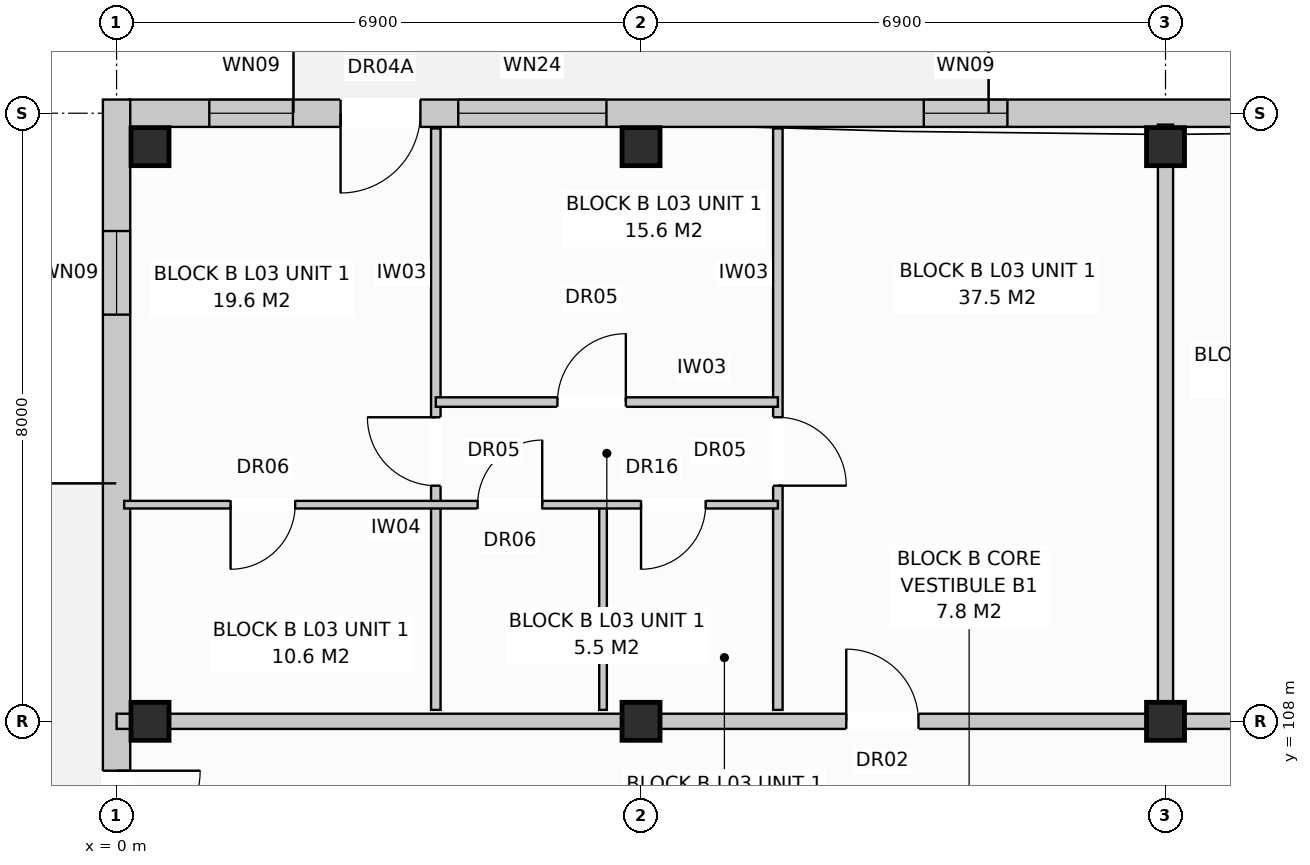
"""IFC4 building model, lengths in metres.
Left out: names, types, materials, properties, quantities, classifications, styles, units other than length and angle.
Written with IfcOpenShell. Run it as: python <this file> out.ifc"""

import sys

from ifc_helpers import new_model, si_unit, direction, frame, frame_2d, origin, origin_with_axes, origin_2d, place, context, subcontext, project, spatial, rectangle, extrude, element, fill, save


model = new_model("IFC4")
c1 = context("Model", 3, precision=1e-05, world=origin(), true_north=direction((0.0, 1.0)))
c2 = subcontext(c1, "Body", "Model", "MODEL_VIEW")
j1 = project(units=[si_unit("LENGTHUNIT", "METRE"), si_unit("PLANEANGLEUNIT", "RADIAN")], contexts=[c1])
p1 = place(None, origin())
s1 = spatial("IfcSite", under=j1, at=p1, CompositionType="ELEMENT")
p2 = place(p1, origin())
s2 = spatial("IfcBuilding", under=s1, at=p2, CompositionType="ELEMENT")
p3 = place(p2, frame((0.0, 0.0, 11.2)))
s3 = spatial("IfcBuildingStorey", under=s2, at=p3, CompositionType="ELEMENT", Elevation=11.2)
for number, where, z_axis, x_axis in (
    (1, (0.44, 108.0, 0.0), (0.0, 0.0, 1.0), (1.0, 0.0, 0.0)),
    (2, (0.44, 115.56, 0.0), (0.0, 0.0, 1.0), (1.0, 0.0, 0.0)),
    (3, (6.9, 108.0, 0.0), (0.0, 0.0, 1.0), (1.0, 0.0, 0.0)),
    (4, (6.9, 115.56, 0.0), (0.0, 0.0, 1.0), (1.0, 0.0, 0.0)),
    (5, (13.8, 108.0, 0.0), (0.0, 0.0, 1.0), (1.0, 0.0, 0.0)),
    (6, (13.8, 115.56, 0.0), (0.0, 0.0, 1.0), (1.0, 0.0, 0.0)),
):
    element("IfcColumn", number, at=place(p3, frame(where, z_axis=z_axis, x_axis=x_axis)), inside=s3, PredefinedType="COLUMN", context=c2, shape_type="SweptSolid", body=[
        extrude(rectangle(XDim=0.5, YDim=0.5, at=origin_2d()), origin(), (0.0, 0.0, 1.0), 3.2),
    ])
p4 = place(p3, frame((0.17, 116.0, 0.0), z_axis=(0.0, 0.0, 1.0), x_axis=(1.0, 0.0, 0.0)))
e7 = element("IfcWall", 7, at=p4, inside=s3, PredefinedType="STANDARD", context=c2, shape_type="SweptSolid", body=[
    extrude(rectangle(XDim=54.86, YDim=0.36, at=frame_2d((27.43, 0.0))), origin(), (0.0, 0.0, 1.0), 2.94),
])
p5 = place(p4, frame((2.777, 0.0, 0.0)))
e8 = element("IfcOpeningElement", 8, at=p5, cuts=e7, PredefinedType="OPENING", context=c2, shape_type="SweptSolid", body=[
    extrude(rectangle(XDim=1.05, YDim=2.12, at=frame_2d((0.525, 1.06))), frame((0.0, 0.192, 0.0), z_axis=(0.0, -1.0, 0.0), x_axis=(1.0, 0.0, 0.0)), (0.0, 0.0, 1.0), 0.384),
])
p6 = place(p4, frame((16.277, 0.0, 0.0)))
e9 = element("IfcOpeningElement", 9, at=p6, cuts=e7, PredefinedType="OPENING", context=c2, shape_type="SweptSolid", body=[
    extrude(rectangle(XDim=1.05, YDim=2.12, at=frame_2d((0.525, 1.06))), frame((0.0, 0.192, 0.0), z_axis=(0.0, -1.0, 0.0), x_axis=(1.0, 0.0, 0.0)), (0.0, 0.0, 1.0), 0.384),
])
p7 = place(p4, frame((30.777, 0.0, 0.0)))
e10 = element("IfcOpeningElement", 10, at=p7, cuts=e7, PredefinedType="OPENING", context=c2, shape_type="SweptSolid", body=[
    extrude(rectangle(XDim=1.05, YDim=2.12, at=frame_2d((0.525, 1.06))), frame((0.0, 0.192, 0.0), z_axis=(0.0, -1.0, 0.0), x_axis=(1.0, 0.0, 0.0)), (0.0, 0.0, 1.0), 0.384),
])
p8 = place(p4, frame((45.157, 0.0, 0.0)))
e11 = element("IfcOpeningElement", 11, at=p8, cuts=e7, PredefinedType="OPENING", context=c2, shape_type="SweptSolid", body=[
    extrude(rectangle(XDim=1.05, YDim=2.12, at=frame_2d((0.525, 1.06))), frame((0.0, 0.192, 0.0), z_axis=(0.0, -1.0, 0.0), x_axis=(1.0, 0.0, 0.0)), (0.0, 0.0, 1.0), 0.384),
])
p9 = place(p4, frame((1.05, 0.0, 0.72)))
e12 = element("IfcOpeningElement", 12, at=p9, cuts=e7, PredefinedType="OPENING", context=c2, shape_type="SweptSolid", body=[
    extrude(rectangle(XDim=1.1, YDim=1.5, at=frame_2d((0.55, 0.75))), frame((0.0, 0.192, 0.0), z_axis=(0.0, -1.0, 0.0), x_axis=(1.0, 0.0, 0.0)), (0.0, 0.0, 1.0), 0.384),
])
p10 = place(p4, frame((4.325, 0.0, 0.8)))
e13 = element("IfcOpeningElement", 13, at=p10, cuts=e7, PredefinedType="OPENING", context=c2, shape_type="SweptSolid", body=[
    extrude(rectangle(XDim=1.95, YDim=1.65, at=frame_2d((0.975, 0.825))), frame((0.0, 0.192, 0.0), z_axis=(0.0, -1.0, 0.0), x_axis=(1.0, 0.0, 0.0)), (0.0, 0.0, 1.0), 0.384),
])
p11 = place(p4, frame((10.45, 0.0, 0.72)))
e14 = element("IfcOpeningElement", 14, at=p11, cuts=e7, PredefinedType="OPENING", context=c2, shape_type="SweptSolid", body=[
    extrude(rectangle(XDim=1.1, YDim=1.5, at=frame_2d((0.55, 0.75))), frame((0.0, 0.192, 0.0), z_axis=(0.0, -1.0, 0.0), x_axis=(1.0, 0.0, 0.0)), (0.0, 0.0, 1.0), 0.384),
])
p12 = place(p4, frame((14.55, 0.0, 0.72)))
e15 = element("IfcOpeningElement", 15, at=p12, cuts=e7, PredefinedType="OPENING", context=c2, shape_type="SweptSolid", body=[
    extrude(rectangle(XDim=1.1, YDim=1.5, at=frame_2d((0.55, 0.75))), frame((0.0, 0.192, 0.0), z_axis=(0.0, -1.0, 0.0), x_axis=(1.0, 0.0, 0.0)), (0.0, 0.0, 1.0), 0.384),
])
p13 = place(p4, frame((18.025, 0.0, 0.8)))
e16 = element("IfcOpeningElement", 16, at=p13, cuts=e7, PredefinedType="OPENING", context=c2, shape_type="SweptSolid", body=[
    extrude(rectangle(XDim=1.95, YDim=1.65, at=frame_2d((0.975, 0.825))), frame((0.0, 0.192, 0.0), z_axis=(0.0, -1.0, 0.0), x_axis=(1.0, 0.0, 0.0)), (0.0, 0.0, 1.0), 0.384),
])
p14 = place(p4, frame((22.8, 0.0, 0.8)))
e17 = element("IfcOpeningElement", 17, at=p14, cuts=e7, PredefinedType="OPENING", context=c2, shape_type="SweptSolid", body=[
    extrude(rectangle(XDim=1.8, YDim=1.7, at=frame_2d((0.9, 0.85))), frame((0.0, 0.192, 0.0), z_axis=(0.0, -1.0, 0.0), x_axis=(1.0, 0.0, 0.0)), (0.0, 0.0, 1.0), 0.384),
])
p15 = place(p4, frame((28.85, 0.0, 0.72)))
e18 = element("IfcOpeningElement", 18, at=p15, cuts=e7, PredefinedType="OPENING", context=c2, shape_type="SweptSolid", body=[
    extrude(rectangle(XDim=1.1, YDim=1.5, at=frame_2d((0.55, 0.75))), frame((0.0, 0.192, 0.0), z_axis=(0.0, -1.0, 0.0), x_axis=(1.0, 0.0, 0.0)), (0.0, 0.0, 1.0), 0.384),
])
p16 = place(p4, frame((34.825, 0.0, 0.8)))
e19 = element("IfcOpeningElement", 19, at=p16, cuts=e7, PredefinedType="OPENING", context=c2, shape_type="SweptSolid", body=[
    extrude(rectangle(XDim=1.95, YDim=1.65, at=frame_2d((0.975, 0.825))), frame((0.0, 0.192, 0.0), z_axis=(0.0, -1.0, 0.0), x_axis=(1.0, 0.0, 0.0)), (0.0, 0.0, 1.0), 0.384),
])
p17 = place(p4, frame((38.65, 0.0, 0.72)))
e20 = element("IfcOpeningElement", 20, at=p17, cuts=e7, PredefinedType="OPENING", context=c2, shape_type="SweptSolid", body=[
    extrude(rectangle(XDim=1.1, YDim=1.5, at=frame_2d((0.55, 0.75))), frame((0.0, 0.192, 0.0), z_axis=(0.0, -1.0, 0.0), x_axis=(1.0, 0.0, 0.0)), (0.0, 0.0, 1.0), 0.384),
])
p18 = place(p4, frame((43.35, 0.0, 0.72)))
e21 = element("IfcOpeningElement", 21, at=p18, cuts=e7, PredefinedType="OPENING", context=c2, shape_type="SweptSolid", body=[
    extrude(rectangle(XDim=1.1, YDim=1.5, at=frame_2d((0.55, 0.75))), frame((0.0, 0.192, 0.0), z_axis=(0.0, -1.0, 0.0), x_axis=(1.0, 0.0, 0.0)), (0.0, 0.0, 1.0), 0.384),
])
p19 = place(p4, frame((48.583, 0.0, 0.8)))
e22 = element("IfcOpeningElement", 22, at=p19, cuts=e7, PredefinedType="OPENING", context=c2, shape_type="SweptSolid", body=[
    extrude(rectangle(XDim=1.95, YDim=1.65, at=frame_2d((0.975, 0.825))), frame((0.0, 0.192, 0.0), z_axis=(0.0, -1.0, 0.0), x_axis=(1.0, 0.0, 0.0)), (0.0, 0.0, 1.0), 0.384),
])
p20 = place(p4, frame((52.25, 0.0, 0.72)))
e23 = element("IfcOpeningElement", 23, at=p20, cuts=e7, PredefinedType="OPENING", context=c2, shape_type="SweptSolid", body=[
    extrude(rectangle(XDim=1.1, YDim=1.5, at=frame_2d((0.55, 0.75))), frame((0.0, 0.192, 0.0), z_axis=(0.0, -1.0, 0.0), x_axis=(1.0, 0.0, 0.0)), (0.0, 0.0, 1.0), 0.384),
])
p21 = place(p3, frame((0.0, 97.42, 0.0), z_axis=(0.0, 0.0, 1.0), x_axis=(0.0, 1.0, 0.0)))
e24 = element("IfcWall", 24, at=p21, inside=s3, PredefinedType="STANDARD", context=c2, shape_type="SweptSolid", body=[
    extrude(rectangle(XDim=18.76, YDim=0.36, at=frame_2d((9.38, 0.0))), origin(), (0.0, 0.0, 1.0), 2.94),
])
p22 = place(p21, frame((8.83, 0.0, 0.0)))
e25 = element("IfcOpeningElement", 25, at=p22, cuts=e24, PredefinedType="OPENING", context=c2, shape_type="SweptSolid", body=[
    extrude(rectangle(XDim=1.1, YDim=2.1, at=frame_2d((0.55, 1.05))), frame((0.0, 0.192, 0.0), z_axis=(0.0, -1.0, 0.0), x_axis=(1.0, 0.0, 0.0)), (0.0, 0.0, 1.0), 0.384),
])
p23 = place(p21, frame((1.73, 0.0, 0.72)))
e26 = element("IfcOpeningElement", 26, at=p23, cuts=e24, PredefinedType="OPENING", context=c2, shape_type="SweptSolid", body=[
    extrude(rectangle(XDim=1.1, YDim=1.5, at=frame_2d((0.55, 0.75))), frame((0.0, 0.192, 0.0), z_axis=(0.0, -1.0, 0.0), x_axis=(1.0, 0.0, 0.0)), (0.0, 0.0, 1.0), 0.384),
])
p24 = place(p21, frame((15.93, 0.0, 0.72)))
e27 = element("IfcOpeningElement", 27, at=p24, cuts=e24, PredefinedType="OPENING", context=c2, shape_type="SweptSolid", body=[
    extrude(rectangle(XDim=1.1, YDim=1.5, at=frame_2d((0.55, 0.75))), frame((0.0, 0.192, 0.0), z_axis=(0.0, -1.0, 0.0), x_axis=(1.0, 0.0, 0.0)), (0.0, 0.0, 1.0), 0.384),
])
p25 = place(p3, frame((13.8, 108.15, 0.0), z_axis=(0.0, 0.0, 1.0), x_axis=(0.0, 1.0, 0.0)))
e28 = element("IfcWall", 28, at=p25, inside=s3, PredefinedType="PARTITIONING", context=c2, shape_type="SweptSolid", body=[
    extrude(rectangle(XDim=7.7, YDim=0.2, at=frame_2d((3.85, 0.0))), origin(), (0.0, 0.0, 1.0), 2.94),
])
p26 = place(p3, frame((0.0, 108.0, 0.0), z_axis=(0.0, 0.0, 1.0), x_axis=(1.0, 0.0, 0.0)))
e29 = element("IfcWall", 29, at=p26, inside=s3, PredefinedType="PARTITIONING", context=c2, shape_type="SweptSolid", body=[
    extrude(rectangle(XDim=13.8, YDim=0.2, at=frame_2d((6.9, 0.0))), origin(), (0.0, 0.0, 1.0), 2.38),
])
p27 = place(p26, frame((9.6, 0.0, 0.0)))
e30 = element("IfcOpeningElement", 30, at=p27, cuts=e29, PredefinedType="OPENING", context=c2, shape_type="SweptSolid", body=[
    extrude(rectangle(XDim=0.95, YDim=2.15, at=frame_2d((0.475, 1.075))), frame((0.0, 0.112, 0.0), z_axis=(0.0, -1.0, 0.0), x_axis=(1.0, 0.0, 0.0)), (0.0, 0.0, 1.0), 0.224),
])
p28 = place(p3, frame((8.7, 108.15, 0.0), z_axis=(0.0, 0.0, 1.0), x_axis=(0.0, 1.0, 0.0)))
e31 = element("IfcWall", 31, at=p28, inside=s3, PredefinedType="PARTITIONING", context=c2, shape_type="SweptSolid", body=[
    extrude(rectangle(XDim=7.65, YDim=0.125, at=frame_2d((3.825, 0.0))), origin(), (0.0, 0.0, 1.0), 2.94),
])
p29 = place(p28, frame((2.95, 0.0, 0.0)))
e32 = element("IfcOpeningElement", 32, at=p29, cuts=e31, PredefinedType="OPENING", context=c2, shape_type="SweptSolid", body=[
    extrude(rectangle(XDim=0.9, YDim=2.1, at=frame_2d((0.45, 1.05))), frame((0.0, 0.074, 0.0), z_axis=(0.0, -1.0, 0.0), x_axis=(1.0, 0.0, 0.0)), (0.0, 0.0, 1.0), 0.149),
])
p30 = place(p3, frame((4.2, 108.15, 0.0), z_axis=(0.0, 0.0, 1.0), x_axis=(0.0, 1.0, 0.0)))
e33 = element("IfcWall", 33, at=p30, inside=s3, PredefinedType="PARTITIONING", context=c2, shape_type="SweptSolid", body=[
    extrude(rectangle(XDim=7.65, YDim=0.125, at=frame_2d((3.825, 0.0))), origin(), (0.0, 0.0, 1.0), 2.94),
])
p31 = place(p30, frame((2.95, 0.0, 0.0)))
e34 = element("IfcOpeningElement", 34, at=p31, cuts=e33, PredefinedType="OPENING", context=c2, shape_type="SweptSolid", body=[
    extrude(rectangle(XDim=0.9, YDim=2.1, at=frame_2d((0.45, 1.05))), frame((0.0, 0.074, 0.0), z_axis=(0.0, -1.0, 0.0), x_axis=(1.0, 0.0, 0.0)), (0.0, 0.0, 1.0), 0.149),
])
p32 = place(p3, frame((6.4, 108.15, 0.0), z_axis=(0.0, 0.0, 1.0), x_axis=(0.0, 1.0, 0.0)))
e35 = element("IfcWall", 35, at=p32, inside=s3, PredefinedType="PARTITIONING", context=c2, shape_type="SweptSolid", body=[
    extrude(rectangle(XDim=2.7, YDim=0.1, at=frame_2d((1.35, 0.0))), origin(), (0.0, 0.0, 1.0), 2.94),
])
p33 = place(p3, frame((0.1, 110.85, 0.0), z_axis=(0.0, 0.0, 1.0), x_axis=(1.0, 0.0, 0.0)))
e36 = element("IfcWall", 36, at=p33, inside=s3, PredefinedType="PARTITIONING", context=c2, shape_type="SweptSolid", body=[
    extrude(rectangle(XDim=8.6, YDim=0.1, at=frame_2d((4.3, 0.0))), origin(), (0.0, 0.0, 1.0), 2.94),
])
p34 = place(p33, frame((1.4, 0.0, 0.0)))
e37 = element("IfcOpeningElement", 37, at=p34, cuts=e36, PredefinedType="OPENING", context=c2, shape_type="SweptSolid", body=[
    extrude(rectangle(XDim=0.85, YDim=2.05, at=frame_2d((0.425, 1.025))), frame((0.0, 0.062, 0.0), z_axis=(0.0, -1.0, 0.0), x_axis=(1.0, 0.0, 0.0)), (0.0, 0.0, 1.0), 0.124),
])
p35 = place(p33, frame((4.65, 0.0, 0.0)))
e38 = element("IfcOpeningElement", 38, at=p35, cuts=e36, PredefinedType="OPENING", context=c2, shape_type="SweptSolid", body=[
    extrude(rectangle(XDim=0.85, YDim=2.05, at=frame_2d((0.425, 1.025))), frame((0.0, 0.062, 0.0), z_axis=(0.0, -1.0, 0.0), x_axis=(1.0, 0.0, 0.0)), (0.0, 0.0, 1.0), 0.124),
])
p36 = place(p33, frame((6.8, 0.0, 0.0)))
e39 = element("IfcOpeningElement", 39, at=p36, cuts=e36, PredefinedType="OPENING", context=c2, shape_type="SweptSolid", body=[
    extrude(rectangle(XDim=0.85, YDim=2.1, at=frame_2d((0.425, 1.05))), frame((0.0, 0.062, 0.0), z_axis=(0.0, -1.0, 0.0), x_axis=(1.0, 0.0, 0.0)), (0.0, 0.0, 1.0), 0.124),
])
p37 = place(p3, frame((4.2, 112.2, 0.0), z_axis=(0.0, 0.0, 1.0), x_axis=(1.0, 0.0, 0.0)))
e40 = element("IfcWall", 40, at=p37, inside=s3, PredefinedType="PARTITIONING", context=c2, shape_type="SweptSolid", body=[
    extrude(rectangle(XDim=4.5, YDim=0.125, at=frame_2d((2.25, 0.0))), origin(), (0.0, 0.0, 1.0), 2.94),
])
p38 = place(p37, frame((1.6, 0.0, 0.0)))
e41 = element("IfcOpeningElement", 41, at=p38, cuts=e40, PredefinedType="OPENING", context=c2, shape_type="SweptSolid", body=[
    extrude(rectangle(XDim=0.9, YDim=2.1, at=frame_2d((0.45, 1.05))), frame((0.0, 0.074, 0.0), z_axis=(0.0, -1.0, 0.0), x_axis=(1.0, 0.0, 0.0)), (0.0, 0.0, 1.0), 0.149),
])
p39 = place(p3, frame((13.8, 108.0, 0.0), z_axis=(0.0, 0.0, 1.0), x_axis=(1.0, 0.0, 0.0)))
e42 = element("IfcWall", 42, at=p39, inside=s3, PredefinedType="PARTITIONING", context=c2, shape_type="SweptSolid", body=[
    extrude(rectangle(XDim=6.9, YDim=0.2, at=frame_2d((3.45, 0.0))), origin(), (0.0, 0.0, 1.0), 2.38),
])
p40 = place(p39, frame((2.0, 0.0, 0.0)))
e43 = element("IfcOpeningElement", 43, at=p40, cuts=e42, PredefinedType="OPENING", context=c2, shape_type="SweptSolid", body=[
    extrude(rectangle(XDim=0.95, YDim=2.15, at=frame_2d((0.475, 1.075))), frame((0.0, 0.112, 0.0), z_axis=(0.0, -1.0, 0.0), x_axis=(1.0, 0.0, 0.0)), (0.0, 0.0, 1.0), 0.224),
])
p41 = place(p5, frame((1.05, 0.0, 0.0), z_axis=(0.0, 0.0, 1.0), x_axis=(-1.0, 0.0, 0.0)))
e44 = element("IfcDoor", 44, at=p41, inside=s3, OperationType="SINGLE_SWING_LEFT", PredefinedType="DOOR", context=c2, shape_type="SweptSolid", body=[
    extrude(rectangle(XDim=1.05, YDim=2.12, at=frame_2d((0.525, 1.06))), frame((0.0, 0.025, 0.0), z_axis=(0.0, -1.0, 0.0), x_axis=(1.0, 0.0, 0.0)), (0.0, 0.0, 1.0), 0.05),
])
fill(e8, e44)
p42 = place(p9, origin_with_axes())
e45 = element("IfcWindow", 45, at=p42, inside=s3, PartitioningType="SINGLE_PANEL", PredefinedType="WINDOW", context=c2, shape_type="SweptSolid", body=[
    extrude(rectangle(XDim=1.1, YDim=1.5, at=frame_2d((0.55, 0.75))), frame((0.0, 0.03, 0.0), z_axis=(0.0, -1.0, 0.0), x_axis=(1.0, 0.0, 0.0)), (0.0, 0.0, 1.0), 0.06),
])
fill(e12, e45)
p43 = place(p10, origin_with_axes())
e46 = element("IfcWindow", 46, at=p43, inside=s3, PartitioningType="SINGLE_PANEL", PredefinedType="WINDOW", context=c2, shape_type="SweptSolid", body=[
    extrude(rectangle(XDim=1.95, YDim=1.65, at=frame_2d((0.975, 0.825))), frame((0.0, 0.03, 0.0), z_axis=(0.0, -1.0, 0.0), x_axis=(1.0, 0.0, 0.0)), (0.0, 0.0, 1.0), 0.06),
])
fill(e13, e46)
p44 = place(p11, origin_with_axes())
e47 = element("IfcWindow", 47, at=p44, inside=s3, PartitioningType="SINGLE_PANEL", PredefinedType="WINDOW", context=c2, shape_type="SweptSolid", body=[
    extrude(rectangle(XDim=1.1, YDim=1.5, at=frame_2d((0.55, 0.75))), frame((0.0, 0.03, 0.0), z_axis=(0.0, -1.0, 0.0), x_axis=(1.0, 0.0, 0.0)), (0.0, 0.0, 1.0), 0.06),
])
fill(e14, e47)
p45 = place(p22, frame((1.1, 0.0, 0.0), z_axis=(0.0, 0.0, 1.0), x_axis=(-1.0, 0.0, 0.0)))
e48 = element("IfcDoor", 48, at=p45, inside=s3, OperationType="SINGLE_SWING_RIGHT", PredefinedType="DOOR", context=c2, shape_type="SweptSolid", body=[
    extrude(rectangle(XDim=1.1, YDim=2.1, at=frame_2d((0.55, 1.05))), frame((0.0, 0.025, 0.0), z_axis=(0.0, -1.0, 0.0), x_axis=(1.0, 0.0, 0.0)), (0.0, 0.0, 1.0), 0.05),
])
fill(e25, e48)
p46 = place(p24, origin_with_axes())
e49 = element("IfcWindow", 49, at=p46, inside=s3, PartitioningType="SINGLE_PANEL", PredefinedType="WINDOW", context=c2, shape_type="SweptSolid", body=[
    extrude(rectangle(XDim=1.1, YDim=1.5, at=frame_2d((0.55, 0.75))), frame((0.0, 0.03, 0.0), z_axis=(0.0, -1.0, 0.0), x_axis=(1.0, 0.0, 0.0)), (0.0, 0.0, 1.0), 0.06),
])
fill(e27, e49)
p47 = place(p27, origin_with_axes())
e50 = element("IfcDoor", 50, at=p47, inside=s3, OperationType="SINGLE_SWING_LEFT", PredefinedType="DOOR", context=c2, shape_type="SweptSolid", body=[
    extrude(rectangle(XDim=0.95, YDim=2.15, at=frame_2d((0.475, 1.075))), frame((0.0, 0.025, 0.0), z_axis=(0.0, -1.0, 0.0), x_axis=(1.0, 0.0, 0.0)), (0.0, 0.0, 1.0), 0.05),
])
fill(e30, e50)
p48 = place(p29, frame((0.9, 0.0, 0.0), z_axis=(0.0, 0.0, 1.0), x_axis=(-1.0, 0.0, 0.0)))
e51 = element("IfcDoor", 51, at=p48, inside=s3, OperationType="SINGLE_SWING_LEFT", PredefinedType="DOOR", context=c2, shape_type="SweptSolid", body=[
    extrude(rectangle(XDim=0.9, YDim=2.1, at=frame_2d((0.45, 1.05))), frame((0.0, 0.025, 0.0), z_axis=(0.0, -1.0, 0.0), x_axis=(1.0, 0.0, 0.0)), (0.0, 0.0, 1.0), 0.05),
])
fill(e32, e51)
p49 = place(p31, origin_with_axes())
e52 = element("IfcDoor", 52, at=p49, inside=s3, OperationType="SINGLE_SWING_RIGHT", PredefinedType="DOOR", context=c2, shape_type="SweptSolid", body=[
    extrude(rectangle(XDim=0.9, YDim=2.1, at=frame_2d((0.45, 1.05))), frame((0.0, 0.025, 0.0), z_axis=(0.0, -1.0, 0.0), x_axis=(1.0, 0.0, 0.0)), (0.0, 0.0, 1.0), 0.05),
])
fill(e34, e52)
p50 = place(p34, frame((0.85, 0.0, 0.0), z_axis=(0.0, 0.0, 1.0), x_axis=(-1.0, 0.0, 0.0)))
e53 = element("IfcDoor", 53, at=p50, inside=s3, OperationType="SINGLE_SWING_LEFT", PredefinedType="DOOR", context=c2, shape_type="SweptSolid", body=[
    extrude(rectangle(XDim=0.85, YDim=2.05, at=frame_2d((0.425, 1.025))), frame((0.0, 0.025, 0.0), z_axis=(0.0, -1.0, 0.0), x_axis=(1.0, 0.0, 0.0)), (0.0, 0.0, 1.0), 0.05),
])
fill(e37, e53)
p51 = place(p35, origin_with_axes())
e54 = element("IfcDoor", 54, at=p51, inside=s3, OperationType="SINGLE_SWING_RIGHT", PredefinedType="DOOR", context=c2, shape_type="SweptSolid", body=[
    extrude(rectangle(XDim=0.85, YDim=2.05, at=frame_2d((0.425, 1.025))), frame((0.0, 0.025, 0.0), z_axis=(0.0, -1.0, 0.0), x_axis=(1.0, 0.0, 0.0)), (0.0, 0.0, 1.0), 0.05),
])
fill(e38, e54)
p52 = place(p36, frame((0.85, 0.0, 0.0), z_axis=(0.0, 0.0, 1.0), x_axis=(-1.0, 0.0, 0.0)))
e55 = element("IfcDoor", 55, at=p52, inside=s3, OperationType="SINGLE_SWING_LEFT", PredefinedType="DOOR", context=c2, shape_type="SweptSolid", body=[
    extrude(rectangle(XDim=0.85, YDim=2.1, at=frame_2d((0.425, 1.05))), frame((0.0, 0.025, 0.0), z_axis=(0.0, -1.0, 0.0), x_axis=(1.0, 0.0, 0.0)), (0.0, 0.0, 1.0), 0.05),
])
fill(e39, e55)
p53 = place(p38, origin_with_axes())
e56 = element("IfcDoor", 56, at=p53, inside=s3, OperationType="SINGLE_SWING_RIGHT", PredefinedType="DOOR", context=c2, shape_type="SweptSolid", body=[
    extrude(rectangle(XDim=0.9, YDim=2.1, at=frame_2d((0.45, 1.05))), frame((0.0, 0.025, 0.0), z_axis=(0.0, -1.0, 0.0), x_axis=(1.0, 0.0, 0.0)), (0.0, 0.0, 1.0), 0.05),
])
fill(e41, e56)
save(model, sys.argv[1])
